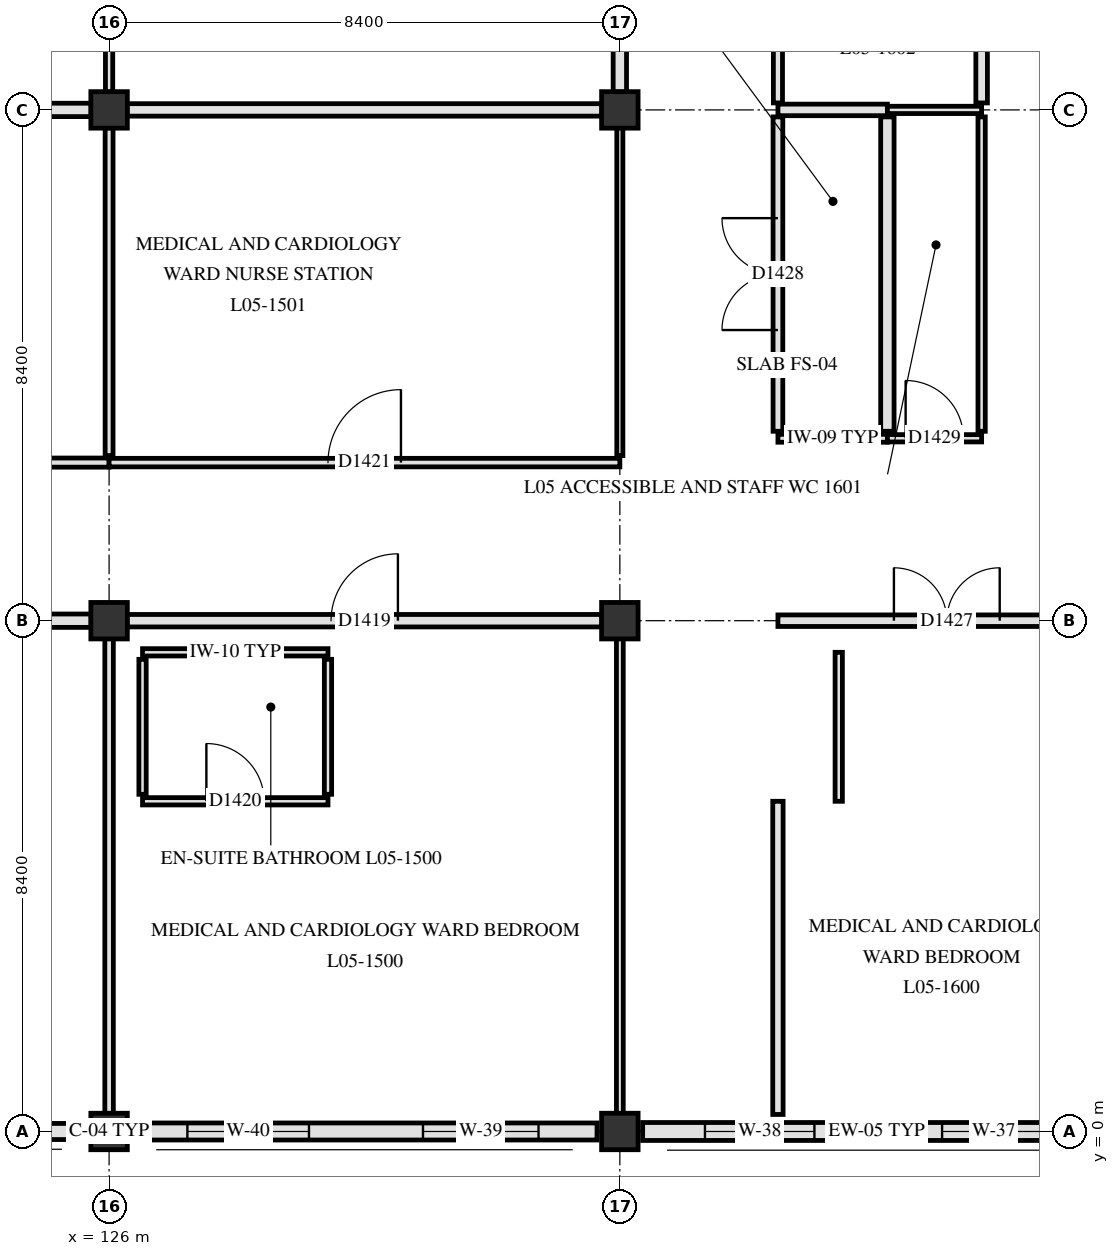
"""IFC4 building model, lengths in metres.
Left out: names, types, materials, properties, quantities, classifications, styles, units other than length and angle.
Written with IfcOpenShell. Run it as: python <this file> out.ifc"""

import sys

from ifc_helpers import new_model, si_unit, direction, frame, frame_2d, origin, origin_2d, place, context, subcontext, project, spatial, rectangle, extrude, element, fill, save


model = new_model("IFC4")
c1 = context("Model", 3, precision=1e-05, world=origin(), true_north=direction((0.0, 1.0)))
c2 = subcontext(c1, "Body", "Model", "MODEL_VIEW")
j1 = project(units=[si_unit("LENGTHUNIT", "METRE"), si_unit("PLANEANGLEUNIT", "RADIAN")], contexts=[c1])
p1 = place(None, origin())
s1 = spatial("IfcSite", under=j1, at=p1, CompositionType="ELEMENT")
p2 = place(p1, origin())
s2 = spatial("IfcBuilding", under=s1, at=p2, CompositionType="ELEMENT")
p3 = place(p2, frame((0.0, 0.0, 22.5)))
s3 = spatial("IfcBuildingStorey", under=s2, at=p3, CompositionType="ELEMENT", Elevation=22.5)
for number, where, z_axis, x_axis in (
    (1, (126.0, 0.0, 0.0), (0.0, 0.0, 1.0), (1.0, 0.0, 0.0)),
    (2, (126.0, 8.4, 0.0), (0.0, 0.0, 1.0), (1.0, 0.0, 0.0)),
    (3, (126.0, 16.8, 0.0), (0.0, 0.0, 1.0), (1.0, 0.0, 0.0)),
    (4, (134.4, 0.0, 0.0), (0.0, 0.0, 1.0), (1.0, 0.0, 0.0)),
    (5, (134.4, 8.4, 0.0), (0.0, 0.0, 1.0), (1.0, 0.0, 0.0)),
    (6, (134.4, 16.8, 0.0), (0.0, 0.0, 1.0), (1.0, 0.0, 0.0)),
):
    element("IfcColumn", number, at=place(p3, frame(where, z_axis=z_axis, x_axis=x_axis)), inside=s3, PredefinedType="COLUMN", context=c2, shape_type="SweptSolid", body=[
        extrude(rectangle(XDim=0.6, YDim=0.6, at=origin_2d()), origin(), (0.0, 0.0, 1.0), 3.9),
    ])
p4 = place(p3, frame((142.475, 0.0, 0.0), z_axis=(0.0, 0.0, 1.0), x_axis=(-1.0, 0.0, 0.0)))
e7 = element("IfcWall", 7, at=p4, inside=s3, PredefinedType="SOLIDWALL", context=c2, shape_type="SweptSolid", body=[
    extrude(rectangle(XDim=7.7, YDim=0.295, at=frame_2d((3.85, 0.0))), origin(), (0.0, 0.0, 1.0), 3.31),
])
p5 = place(p4, frame((1.075, 0.0, 0.85)))
e8 = element("IfcOpeningElement", 8, at=p5, cuts=e7, PredefinedType="OPENING", context=c2, shape_type="SweptSolid", body=[
    extrude(rectangle(XDim=1.7, YDim=1.66, at=frame_2d((0.85, 0.83))), frame((0.0, 0.157, 0.0), z_axis=(0.0, -1.0, 0.0), x_axis=(1.0, 0.0, 0.0)), (0.0, 0.0, 1.0), 0.315),
])
p6 = place(p4, frame((4.875, 0.0, 0.85)))
e9 = element("IfcOpeningElement", 9, at=p6, cuts=e7, PredefinedType="OPENING", context=c2, shape_type="SweptSolid", body=[
    extrude(rectangle(XDim=1.8, YDim=1.66, at=frame_2d((0.9, 0.83))), frame((0.0, 0.157, 0.0), z_axis=(0.0, -1.0, 0.0), x_axis=(1.0, 0.0, 0.0)), (0.0, 0.0, 1.0), 0.315),
])
p7 = place(p3, frame((134.025, 0.0, 0.0), z_axis=(0.0, 0.0, 1.0), x_axis=(-1.0, 0.0, 0.0)))
e10 = element("IfcWall", 10, at=p7, inside=s3, PredefinedType="SOLIDWALL", context=c2, shape_type="SweptSolid", body=[
    extrude(rectangle(XDim=7.65, YDim=0.28, at=frame_2d((3.825, 0.0))), origin(), (0.0, 0.0, 1.0), 3.31),
])
p8 = place(p7, frame((0.962, 0.0, 0.85)))
e11 = element("IfcOpeningElement", 11, at=p8, cuts=e10, PredefinedType="OPENING", context=c2, shape_type="SweptSolid", body=[
    extrude(rectangle(XDim=1.9, YDim=1.66, at=frame_2d((0.95, 0.83))), frame((0.0, 0.15, 0.0), z_axis=(0.0, -1.0, 0.0), x_axis=(1.0, 0.0, 0.0)), (0.0, 0.0, 1.0), 0.3),
])
p9 = place(p7, frame((4.738, 0.0, 0.85)))
e12 = element("IfcOpeningElement", 12, at=p9, cuts=e10, PredefinedType="OPENING", context=c2, shape_type="SweptSolid", body=[
    extrude(rectangle(XDim=2.0, YDim=1.66, at=frame_2d((1.0, 0.83))), frame((0.0, 0.15, 0.0), z_axis=(0.0, -1.0, 0.0), x_axis=(1.0, 0.0, 0.0)), (0.0, 0.0, 1.0), 0.3),
])
p10 = place(p3, frame((125.625, 0.0, 0.0), z_axis=(0.0, 0.0, 1.0), x_axis=(-1.0, 0.0, 0.0)))
e13 = element("IfcWall", 13, at=p10, inside=s3, PredefinedType="SOLIDWALL", context=c2, shape_type="SweptSolid", body=[
    extrude(rectangle(XDim=7.65, YDim=0.265, at=frame_2d((3.825, 0.0))), origin(), (0.0, 0.0, 1.0), 3.31),
])
p11 = place(p10, frame((1.337, 0.0, 0.85)))
e14 = element("IfcOpeningElement", 14, at=p11, cuts=e13, PredefinedType="OPENING", context=c2, shape_type="SweptSolid", body=[
    extrude(rectangle(XDim=1.15, YDim=1.78, at=frame_2d((0.575, 0.89))), frame((0.0, 0.142, 0.0), z_axis=(0.0, -1.0, 0.0), x_axis=(1.0, 0.0, 0.0)), (0.0, 0.0, 1.0), 0.285),
])
p12 = place(p10, frame((5.087, 0.0, 0.85)))
e15 = element("IfcOpeningElement", 15, at=p12, cuts=e13, PredefinedType="OPENING", context=c2, shape_type="SweptSolid", body=[
    extrude(rectangle(XDim=1.3, YDim=1.78, at=frame_2d((0.65, 0.89))), frame((0.0, 0.142, 0.0), z_axis=(0.0, -1.0, 0.0), x_axis=(1.0, 0.0, 0.0)), (0.0, 0.0, 1.0), 0.285),
])
p13 = place(p3, frame((126.55, 5.43, 0.0), z_axis=(0.0, 0.0, 1.0), x_axis=(1.0, 0.0, 0.0)))
e16 = element("IfcWall", 16, at=p13, inside=s3, PredefinedType="PARTITIONING", context=c2, shape_type="SweptSolid", body=[
    extrude(rectangle(XDim=3.05, YDim=0.12, at=frame_2d((1.525, 0.0))), origin(), (0.0, 0.0, 1.0), 3.61),
])
p14 = place(p13, frame((1.05, 0.0, 0.0)))
e17 = element("IfcOpeningElement", 17, at=p14, cuts=e16, PredefinedType="OPENING", context=c2, shape_type="SweptSolid", body=[
    extrude(rectangle(XDim=0.95, YDim=2.1, at=frame_2d((0.475, 1.05))), frame((0.0, 0.07, 0.0), z_axis=(0.0, -1.0, 0.0), x_axis=(1.0, 0.0, 0.0)), (0.0, 0.0, 1.0), 0.14),
])
p15 = place(p3, frame((126.55, 7.88, 0.0), z_axis=(0.0, 0.0, 1.0), x_axis=(1.0, 0.0, 0.0)))
e18 = element("IfcWall", 18, at=p15, inside=s3, PredefinedType="PARTITIONING", context=c2, shape_type="SweptSolid", body=[
    extrude(rectangle(XDim=3.05, YDim=0.12, at=frame_2d((1.525, 0.0))), origin(), (0.0, 0.0, 1.0), 3.61),
])
p16 = place(p3, frame((117.895, 8.4, 0.0), z_axis=(0.0, 0.0, 1.0), x_axis=(1.0, 0.0, 0.0)))
e19 = element("IfcWall", 19, at=p16, inside=s3, PredefinedType="PARTITIONING", context=c2, shape_type="SweptSolid", body=[
    extrude(rectangle(XDim=7.81, YDim=0.22, at=frame_2d((3.905, 0.0))), origin(), (0.0, 0.0, 1.0), 3.16),
])
p17 = place(p16, frame((4.24, 0.0, 0.0)))
e20 = element("IfcOpeningElement", 20, at=p17, cuts=e19, PredefinedType="OPENING", context=c2, shape_type="SweptSolid", body=[
    extrude(rectangle(XDim=1.6, YDim=2.25, at=frame_2d((0.8, 1.125))), frame((0.0, 0.12, 0.0), z_axis=(0.0, -1.0, 0.0), x_axis=(1.0, 0.0, 0.0)), (0.0, 0.0, 1.0), 0.24),
])
p18 = place(p3, frame((126.295, 8.4, 0.0), z_axis=(0.0, 0.0, 1.0), x_axis=(1.0, 0.0, 0.0)))
e21 = element("IfcWall", 21, at=p18, inside=s3, PredefinedType="PARTITIONING", context=c2, shape_type="SweptSolid", body=[
    extrude(rectangle(XDim=7.81, YDim=0.205, at=frame_2d((3.905, 0.0))), origin(), (0.0, 0.0, 1.0), 3.16),
])
p19 = place(p18, frame((3.355, 0.0, 0.0)))
e22 = element("IfcOpeningElement", 22, at=p19, cuts=e21, PredefinedType="OPENING", context=c2, shape_type="SweptSolid", body=[
    extrude(rectangle(XDim=1.1, YDim=2.15, at=frame_2d((0.55, 1.075))), frame((0.0, 0.113, 0.0), z_axis=(0.0, -1.0, 0.0), x_axis=(1.0, 0.0, 0.0)), (0.0, 0.0, 1.0), 0.225),
])
p20 = place(p3, frame((137.0, 8.4, 0.0), z_axis=(0.0, 0.0, 1.0), x_axis=(1.0, 0.0, 0.0)))
e23 = element("IfcWall", 23, at=p20, inside=s3, PredefinedType="PARTITIONING", context=c2, shape_type="SweptSolid", body=[
    extrude(rectangle(XDim=5.555, YDim=0.19, at=frame_2d((2.777, 0.0))), origin(), (0.0, 0.0, 1.0), 3.16),
])
p21 = place(p20, frame((1.907, 0.0, 0.0)))
e24 = element("IfcOpeningElement", 24, at=p21, cuts=e23, PredefinedType="OPENING", context=c2, shape_type="SweptSolid", body=[
    extrude(rectangle(XDim=1.74, YDim=2.24, at=frame_2d((0.87, 1.12))), frame((0.0, 0.105, 0.0), z_axis=(0.0, -1.0, 0.0), x_axis=(1.0, 0.0, 0.0)), (0.0, 0.0, 1.0), 0.21),
])
p22 = place(p3, frame((117.6, 11.0, 0.0), z_axis=(0.0, 0.0, 1.0), x_axis=(1.0, 0.0, 0.0)))
e25 = element("IfcWall", 25, at=p22, inside=s3, PredefinedType="PARTITIONING", context=c2, shape_type="SweptSolid", body=[
    extrude(rectangle(XDim=8.4, YDim=0.15, at=frame_2d((4.2, 0.0))), origin(), (0.0, 0.0, 1.0), 3.3),
])
p23 = place(p22, frame((3.25, 0.0, 0.0)))
e26 = element("IfcOpeningElement", 26, at=p23, cuts=e25, PredefinedType="OPENING", context=c2, shape_type="SweptSolid", body=[
    extrude(rectangle(XDim=1.9, YDim=2.3, at=frame_2d((0.95, 1.15))), frame((0.0, 0.085, 0.0), z_axis=(0.0, -1.0, 0.0), x_axis=(1.0, 0.0, 0.0)), (0.0, 0.0, 1.0), 0.17),
])
p24 = place(p3, frame((126.0, 11.0, 0.0), z_axis=(0.0, 0.0, 1.0), x_axis=(1.0, 0.0, 0.0)))
e27 = element("IfcWall", 27, at=p24, inside=s3, PredefinedType="PARTITIONING", context=c2, shape_type="SweptSolid", body=[
    extrude(rectangle(XDim=8.4, YDim=0.14, at=frame_2d((4.2, 0.0))), origin(), (0.0, 0.0, 1.0), 3.3),
])
p25 = place(p24, frame((3.6, 0.0, 0.0)))
e28 = element("IfcOpeningElement", 28, at=p25, cuts=e27, PredefinedType="OPENING", context=c2, shape_type="SweptSolid", body=[
    extrude(rectangle(XDim=1.2, YDim=2.15, at=frame_2d((0.6, 1.075))), frame((0.0, 0.08, 0.0), z_axis=(0.0, -1.0, 0.0), x_axis=(1.0, 0.0, 0.0)), (0.0, 0.0, 1.0), 0.16),
])
p26 = place(p3, frame((137.0, 11.4, 0.0), z_axis=(0.0, 0.0, 1.0), x_axis=(1.0, 0.0, 0.0)))
e29 = element("IfcWall", 29, at=p26, inside=s3, PredefinedType="PARTITIONING", context=c2, shape_type="SweptSolid", body=[
    extrude(rectangle(XDim=1.8, YDim=0.13, at=frame_2d((0.9, 0.0))), origin(), (0.0, 0.0, 1.0), 3.61),
])
p27 = place(p3, frame((138.8, 11.4, 0.0), z_axis=(0.0, 0.0, 1.0), x_axis=(1.0, 0.0, 0.0)))
e30 = element("IfcWall", 30, at=p27, inside=s3, PredefinedType="PARTITIONING", context=c2, shape_type="SweptSolid", body=[
    extrude(rectangle(XDim=1.55, YDim=0.12, at=frame_2d((0.775, 0.0))), origin(), (0.0, 0.0, 1.0), 3.61),
])
p28 = place(p27, frame((0.3, 0.0, 0.0)))
e31 = element("IfcOpeningElement", 31, at=p28, cuts=e30, PredefinedType="OPENING", context=c2, shape_type="SweptSolid", body=[
    extrude(rectangle(XDim=0.95, YDim=2.1, at=frame_2d((0.475, 1.05))), frame((0.0, 0.07, 0.0), z_axis=(0.0, -1.0, 0.0), x_axis=(1.0, 0.0, 0.0)), (0.0, 0.0, 1.0), 0.14),
])
p29 = place(p3, frame((117.895, 16.8, 0.0), z_axis=(0.0, 0.0, 1.0), x_axis=(1.0, 0.0, 0.0)))
e32 = element("IfcWall", 32, at=p29, inside=s3, PredefinedType="PARTITIONING", context=c2, shape_type="SweptSolid", body=[
    extrude(rectangle(XDim=7.81, YDim=0.22, at=frame_2d((3.905, 0.0))), origin(), (0.0, 0.0, 1.0), 3.16),
])
p30 = place(p3, frame((126.295, 16.8, 0.0), z_axis=(0.0, 0.0, 1.0), x_axis=(1.0, 0.0, 0.0)))
e33 = element("IfcWall", 33, at=p30, inside=s3, PredefinedType="PARTITIONING", context=c2, shape_type="SweptSolid", body=[
    extrude(rectangle(XDim=7.81, YDim=0.205, at=frame_2d((3.905, 0.0))), origin(), (0.0, 0.0, 1.0), 3.16),
])
p31 = place(p3, frame((137.0, 16.8, 0.0), z_axis=(0.0, 0.0, 1.0), x_axis=(1.0, 0.0, 0.0)))
e34 = element("IfcWall", 34, at=p31, inside=s3, PredefinedType="PARTITIONING", context=c2, shape_type="SweptSolid", body=[
    extrude(rectangle(XDim=1.8, YDim=0.19, at=frame_2d((0.9, 0.0))), origin(), (0.0, 0.0, 1.0), 3.16),
])
p32 = place(p3, frame((138.8, 16.8, 0.0), z_axis=(0.0, 0.0, 1.0), x_axis=(1.0, 0.0, 0.0)))
e35 = element("IfcWall", 35, at=p32, inside=s3, PredefinedType="PARTITIONING", context=c2, shape_type="SweptSolid", body=[
    extrude(rectangle(XDim=1.55, YDim=0.12, at=frame_2d((0.775, 0.0))), origin(), (0.0, 0.0, 1.0), 3.16),
])
p33 = place(p3, frame((126.0, 0.295, 0.0), z_axis=(0.0, 0.0, 1.0), x_axis=(0.0, 1.0, 0.0)))
e36 = element("IfcWall", 36, at=p33, inside=s3, PredefinedType="PARTITIONING", context=c2, shape_type="SweptSolid", body=[
    extrude(rectangle(XDim=7.81, YDim=0.14, at=frame_2d((3.905, 0.0))), origin(), (0.0, 0.0, 1.0), 3.3),
])
p34 = place(p3, frame((126.0, 11.115, 0.0), z_axis=(0.0, 0.0, 1.0), x_axis=(0.0, 1.0, 0.0)))
e37 = element("IfcWall", 37, at=p34, inside=s3, PredefinedType="PARTITIONING", context=c2, shape_type="SweptSolid", body=[
    extrude(rectangle(XDim=5.39, YDim=0.13, at=frame_2d((2.695, 0.0))), origin(), (0.0, 0.0, 1.0), 3.3),
])
p35 = place(p3, frame((126.0, 17.095, 0.0), z_axis=(0.0, 0.0, 1.0), x_axis=(0.0, 1.0, 0.0)))
e38 = element("IfcWall", 38, at=p35, inside=s3, PredefinedType="PARTITIONING", context=c2, shape_type="SweptSolid", body=[
    extrude(rectangle(XDim=5.39, YDim=0.12, at=frame_2d((2.695, 0.0))), origin(), (0.0, 0.0, 1.0), 3.3),
])
for number, where, z_axis, x_axis in (
    (39, (126.55, 5.545, 0.0), (0.0, 0.0, 1.0), (0.0, 1.0, 0.0)),
    (40, (129.6, 5.545, 0.0), (0.0, 0.0, 1.0), (0.0, 1.0, 0.0)),
):
    element("IfcWall", number, at=place(p3, frame(where, z_axis=z_axis, x_axis=x_axis)), inside=s3, PredefinedType="PARTITIONING", context=c2, shape_type="SweptSolid", body=[
        extrude(rectangle(XDim=2.22, YDim=0.12, at=frame_2d((1.11, 0.0))), origin(), (0.0, 0.0, 1.0), 3.34),
    ])
p36 = place(p3, frame((134.4, 0.295, 0.0), z_axis=(0.0, 0.0, 1.0), x_axis=(0.0, 1.0, 0.0)))
e41 = element("IfcWall", 41, at=p36, inside=s3, PredefinedType="PARTITIONING", context=c2, shape_type="SweptSolid", body=[
    extrude(rectangle(XDim=7.81, YDim=0.112, at=frame_2d((3.905, 0.0))), origin(), (0.0, 0.0, 1.0), 3.3),
])
p37 = place(p3, frame((134.4, 11.115, 0.0), z_axis=(0.0, 0.0, 1.0), x_axis=(0.0, 1.0, 0.0)))
e42 = element("IfcWall", 42, at=p37, inside=s3, PredefinedType="PARTITIONING", context=c2, shape_type="SweptSolid", body=[
    extrude(rectangle(XDim=5.39, YDim=0.1, at=frame_2d((2.695, 0.0))), origin(), (0.0, 0.0, 1.0), 3.3),
])
p38 = place(p3, frame((134.4, 17.095, 0.0), z_axis=(0.0, 0.0, 1.0), x_axis=(0.0, 1.0, 0.0)))
e43 = element("IfcWall", 43, at=p38, inside=s3, PredefinedType="PARTITIONING", context=c2, shape_type="SweptSolid", body=[
    extrude(rectangle(XDim=5.39, YDim=0.22, at=frame_2d((2.695, 0.0))), origin(), (0.0, 0.0, 1.0), 3.3),
])
p39 = place(p3, frame((137.0, 0.28, 0.0), z_axis=(0.0, 0.0, 1.0), x_axis=(0.0, 1.0, 0.0)))
e44 = element("IfcWall", 44, at=p39, inside=s3, PredefinedType="PARTITIONING", context=c2, shape_type="SweptSolid", body=[
    extrude(rectangle(XDim=5.15, YDim=0.17, at=frame_2d((2.575, 0.0))), origin(), (0.0, 0.0, 1.0), 3.34),
])
p40 = place(p3, frame((137.0, 11.515, 0.0), z_axis=(0.0, 0.0, 1.0), x_axis=(0.0, 1.0, 0.0)))
e45 = element("IfcWall", 45, at=p40, inside=s3, PredefinedType="PARTITIONING", context=c2, shape_type="SweptSolid", body=[
    extrude(rectangle(XDim=5.17, YDim=0.16, at=frame_2d((2.585, 0.0))), origin(), (0.0, 0.0, 1.0), 3.34),
])
p41 = place(p40, frame((1.665, 0.0, 0.0)))
e46 = element("IfcOpeningElement", 46, at=p41, cuts=e45, PredefinedType="OPENING", context=c2, shape_type="SweptSolid", body=[
    extrude(rectangle(XDim=1.84, YDim=2.28, at=frame_2d((0.92, 1.14))), frame((0.0, 0.09, 0.0), z_axis=(0.0, -1.0, 0.0), x_axis=(1.0, 0.0, 0.0)), (0.0, 0.0, 1.0), 0.18),
])
p42 = place(p3, frame((137.0, 16.915, 0.0), z_axis=(0.0, 0.0, 1.0), x_axis=(0.0, 1.0, 0.0)))
e47 = element("IfcWall", 47, at=p42, inside=s3, PredefinedType="PARTITIONING", context=c2, shape_type="SweptSolid", body=[
    extrude(rectangle(XDim=3.385, YDim=0.15, at=frame_2d((1.692, 0.0))), origin(), (0.0, 0.0, 1.0), 3.34),
])
p43 = place(p3, frame((138.0, 5.43, 0.0), z_axis=(0.0, 0.0, 1.0), x_axis=(0.0, 1.0, 0.0)))
e48 = element("IfcWall", 48, at=p43, inside=s3, PredefinedType="PARTITIONING", context=c2, shape_type="SweptSolid", body=[
    extrude(rectangle(XDim=2.45, YDim=0.12, at=frame_2d((1.225, 0.0))), origin(), (0.0, 0.0, 1.0), 3.34),
])
p44 = place(p3, frame((138.8, 11.515, 0.0), z_axis=(0.0, 0.0, 1.0), x_axis=(0.0, 1.0, 0.0)))
e49 = element("IfcWall", 49, at=p44, inside=s3, PredefinedType="PARTITIONING", context=c2, shape_type="SweptSolid", body=[
    extrude(rectangle(XDim=5.17, YDim=0.22, at=frame_2d((2.585, 0.0))), origin(), (0.0, 0.0, 1.0), 3.34),
])
p45 = place(p3, frame((140.35, 11.515, 0.0), z_axis=(0.0, 0.0, 1.0), x_axis=(0.0, 1.0, 0.0)))
e50 = element("IfcWall", 50, at=p45, inside=s3, PredefinedType="PARTITIONING", context=c2, shape_type="SweptSolid", body=[
    extrude(rectangle(XDim=5.17, YDim=0.12, at=frame_2d((2.585, 0.0))), origin(), (0.0, 0.0, 1.0), 3.34),
])
p46 = place(p3, frame((140.35, 16.915, 0.0), z_axis=(0.0, 0.0, 1.0), x_axis=(0.0, 1.0, 0.0)))
e51 = element("IfcWall", 51, at=p46, inside=s3, PredefinedType="PARTITIONING", context=c2, shape_type="SweptSolid", body=[
    extrude(rectangle(XDim=2.22, YDim=0.19, at=frame_2d((1.11, 0.0))), origin(), (0.0, 0.0, 1.0), 3.61),
])
p47 = place(p5, origin())
e52 = element("IfcWindow", 52, at=p47, inside=s3, PartitioningType="SINGLE_PANEL", PredefinedType="WINDOW", context=c2, shape_type="SweptSolid", body=[
    extrude(rectangle(XDim=1.7, YDim=1.66, at=frame_2d((0.85, 0.83))), frame((0.0, 0.03, 0.0), z_axis=(0.0, -1.0, 0.0), x_axis=(1.0, 0.0, 0.0)), (0.0, 0.0, 1.0), 0.06),
])
fill(e8, e52)
p48 = place(p6, origin())
e53 = element("IfcWindow", 53, at=p48, inside=s3, PartitioningType="SINGLE_PANEL", PredefinedType="WINDOW", context=c2, shape_type="SweptSolid", body=[
    extrude(rectangle(XDim=1.8, YDim=1.66, at=frame_2d((0.9, 0.83))), frame((0.0, 0.03, 0.0), z_axis=(0.0, -1.0, 0.0), x_axis=(1.0, 0.0, 0.0)), (0.0, 0.0, 1.0), 0.06),
])
fill(e9, e53)
p49 = place(p8, origin())
e54 = element("IfcWindow", 54, at=p49, inside=s3, PartitioningType="SINGLE_PANEL", PredefinedType="WINDOW", context=c2, shape_type="SweptSolid", body=[
    extrude(rectangle(XDim=1.9, YDim=1.66, at=frame_2d((0.95, 0.83))), frame((0.0, 0.03, 0.0), z_axis=(0.0, -1.0, 0.0), x_axis=(1.0, 0.0, 0.0)), (0.0, 0.0, 1.0), 0.06),
])
fill(e11, e54)
p50 = place(p9, origin())
e55 = element("IfcWindow", 55, at=p50, inside=s3, PartitioningType="SINGLE_PANEL", PredefinedType="WINDOW", context=c2, shape_type="SweptSolid", body=[
    extrude(rectangle(XDim=2.0, YDim=1.66, at=frame_2d((1.0, 0.83))), frame((0.0, 0.03, 0.0), z_axis=(0.0, -1.0, 0.0), x_axis=(1.0, 0.0, 0.0)), (0.0, 0.0, 1.0), 0.06),
])
fill(e12, e55)
p51 = place(p19, origin())
e56 = element("IfcDoor", 56, at=p51, inside=s3, OperationType="SINGLE_SWING_RIGHT", PredefinedType="DOOR", context=c2, shape_type="SweptSolid", body=[
    extrude(rectangle(XDim=1.1, YDim=2.15, at=frame_2d((0.55, 1.075))), frame((0.0, 0.025, 0.0), z_axis=(0.0, -1.0, 0.0), x_axis=(1.0, 0.0, 0.0)), (0.0, 0.0, 1.0), 0.05),
])
fill(e22, e56)
p52 = place(p14, origin())
e57 = element("IfcDoor", 57, at=p52, inside=s3, OperationType="SINGLE_SWING_LEFT", PredefinedType="DOOR", context=c2, shape_type="SweptSolid", body=[
    extrude(rectangle(XDim=0.95, YDim=2.1, at=frame_2d((0.475, 1.05))), frame((0.0, 0.025, 0.0), z_axis=(0.0, -1.0, 0.0), x_axis=(1.0, 0.0, 0.0)), (0.0, 0.0, 1.0), 0.05),
])
fill(e17, e57)
p53 = place(p25, origin())
e58 = element("IfcDoor", 58, at=p53, inside=s3, OperationType="SINGLE_SWING_RIGHT", PredefinedType="DOOR", context=c2, shape_type="SweptSolid", body=[
    extrude(rectangle(XDim=1.2, YDim=2.15, at=frame_2d((0.6, 1.075))), frame((0.0, 0.025, 0.0), z_axis=(0.0, -1.0, 0.0), x_axis=(1.0, 0.0, 0.0)), (0.0, 0.0, 1.0), 0.05),
])
fill(e28, e58)
p54 = place(p21, origin())
e59 = element("IfcDoor", 59, at=p54, inside=s3, OperationType="DOUBLE_SWING_RIGHT", PredefinedType="DOOR", context=c2, shape_type="SweptSolid", body=[
    extrude(rectangle(XDim=1.74, YDim=2.24, at=frame_2d((0.87, 1.12))), frame((0.0, 0.025, 0.0), z_axis=(0.0, -1.0, 0.0), x_axis=(1.0, 0.0, 0.0)), (0.0, 0.0, 1.0), 0.05),
])
fill(e24, e59)
p55 = place(p41, origin())
e60 = element("IfcDoor", 60, at=p55, inside=s3, OperationType="DOUBLE_SWING_LEFT", PredefinedType="DOOR", context=c2, shape_type="SweptSolid", body=[
    extrude(rectangle(XDim=1.84, YDim=2.28, at=frame_2d((0.92, 1.14))), frame((0.0, 0.025, 0.0), z_axis=(0.0, -1.0, 0.0), x_axis=(1.0, 0.0, 0.0)), (0.0, 0.0, 1.0), 0.05),
])
fill(e46, e60)
p56 = place(p28, origin())
e61 = element("IfcDoor", 61, at=p56, inside=s3, OperationType="SINGLE_SWING_LEFT", PredefinedType="DOOR", context=c2, shape_type="SweptSolid", body=[
    extrude(rectangle(XDim=0.95, YDim=2.1, at=frame_2d((0.475, 1.05))), frame((0.0, 0.025, 0.0), z_axis=(0.0, -1.0, 0.0), x_axis=(1.0, 0.0, 0.0)), (0.0, 0.0, 1.0), 0.05),
])
fill(e31, e61)
save(model, sys.argv[1])
